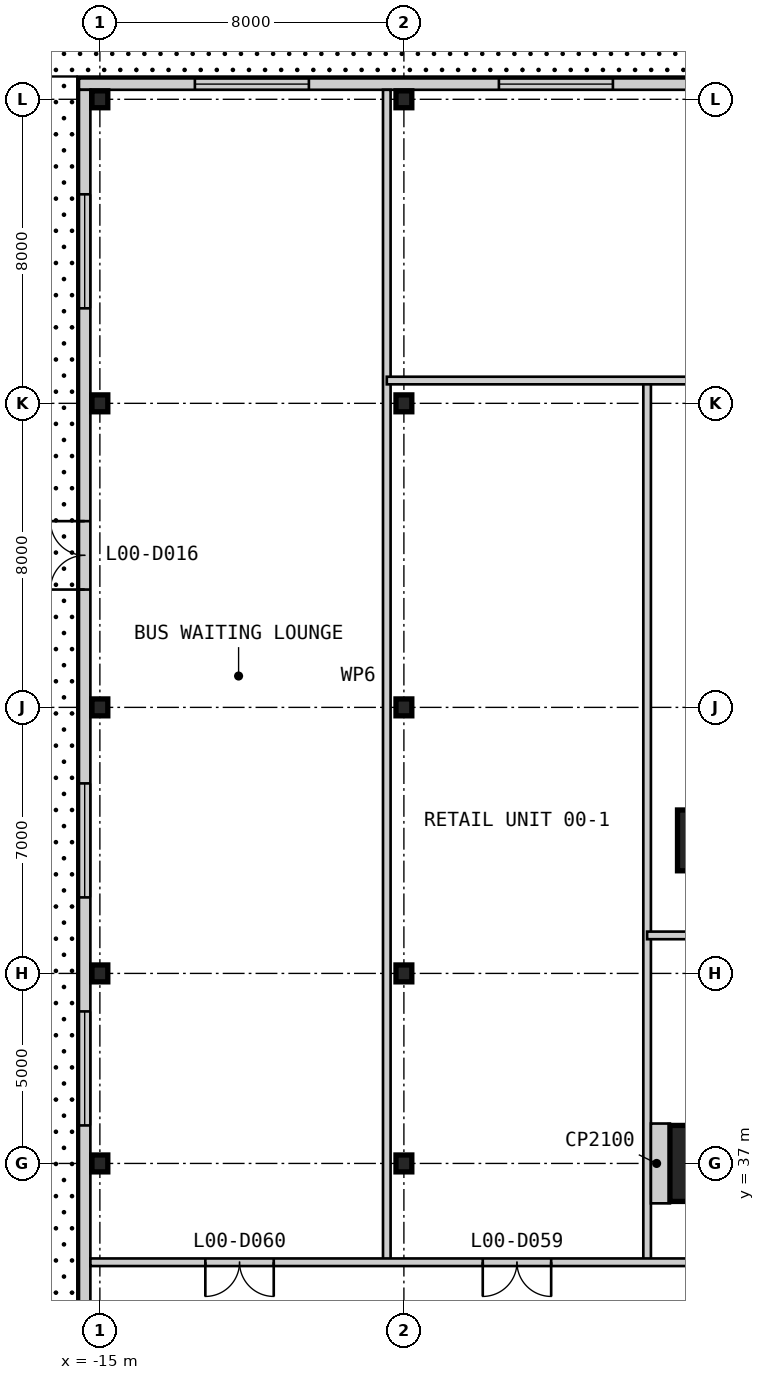
"""IFC4 building model, lengths in metres.
Left out: names, types, materials, properties, quantities, classifications, styles, units other than length and angle.
Written with IfcOpenShell. Run it as: python <this file> out.ifc"""

import sys

from ifc_helpers import new_model, si_unit, direction, frame, frame_2d, origin, origin_2d, place, context, subcontext, project, spatial, rectangle, i_section, extrude, element, fill, save


model = new_model("IFC4")
c1 = context("Model", 3, precision=1e-05, world=origin(), true_north=direction((0.0, 1.0)))
c2 = subcontext(c1, "Body", "Model", "MODEL_VIEW")
j1 = project(units=[si_unit("LENGTHUNIT", "METRE"), si_unit("PLANEANGLEUNIT", "RADIAN")], contexts=[c1])
p1 = place(None, origin())
s1 = spatial("IfcSite", under=j1, at=p1, CompositionType="ELEMENT")
p2 = place(p1, origin())
s2 = spatial("IfcBuilding", under=s1, at=p2, CompositionType="ELEMENT")
p3 = place(p2, origin())
s3 = spatial("IfcBuildingStorey", under=s2, at=p3, CompositionType="ELEMENT", Elevation=0.0)
p4 = place(p3, frame((1.0, 45.5, 0.0), z_axis=(0.0, 0.0, 1.0), x_axis=(1.0, 0.0, 0.0)))
e1 = element("IfcColumn", 1, at=p4, inside=s3, PredefinedType="COLUMN", context=c2, shape_type="SweptSolid", body=[
    extrude(rectangle(XDim=1.6, YDim=1.6, at=origin_2d()), origin(), (0.0, 0.0, 1.0), 7.0),
])
p5 = place(p3, frame((1.0, 37.0, 0.0), z_axis=(0.0, 0.0, 1.0), x_axis=(1.0, 0.0, 0.0)))
e2 = element("IfcColumn", 2, at=p5, inside=s3, PredefinedType="COLUMN", context=c2, shape_type="SweptSolid", body=[
    extrude(rectangle(XDim=2.0, YDim=2.0, at=origin_2d()), origin(), (0.0, 0.0, 1.0), 7.0),
])
for number, where, z_axis, x_axis in (
    (3, (-15.0, 37.0, -0.3), (0.0, 0.0, 1.0), (1.0, 0.0, 0.0)),
    (4, (-15.0, 42.0, -0.3), (0.0, 0.0, 1.0), (1.0, 0.0, 0.0)),
    (5, (-15.0, 49.0, -0.3), (0.0, 0.0, 1.0), (1.0, 0.0, 0.0)),
    (6, (-15.0, 57.0, -0.3), (0.0, 0.0, 1.0), (1.0, 0.0, 0.0)),
    (7, (-15.0, 65.0, -0.3), (0.0, 0.0, 1.0), (1.0, 0.0, 0.0)),
):
    element("IfcColumn", number, at=place(p3, frame(where, z_axis=z_axis, x_axis=x_axis)), inside=s3, PredefinedType="COLUMN", context=c2, shape_type="SweptSolid", body=[
        extrude(i_section(OverallWidth=0.417, OverallDepth=0.445, WebThickness=0.039, FlangeThickness=0.063, at=origin_2d()), origin(), (0.0, 0.0, 1.0), 7.3),
    ])
for number, where, z_axis, x_axis in (
    (8, (-7.0, 37.0, 0.0), (0.0, 0.0, 1.0), (1.0, 0.0, 0.0)),
    (9, (-7.0, 42.0, 0.0), (0.0, 0.0, 1.0), (1.0, 0.0, 0.0)),
    (10, (-7.0, 49.0, 0.0), (0.0, 0.0, 1.0), (1.0, 0.0, 0.0)),
    (11, (-7.0, 57.0, 0.0), (0.0, 0.0, 1.0), (1.0, 0.0, 0.0)),
):
    element("IfcColumn", number, at=place(p3, frame(where, z_axis=z_axis, x_axis=x_axis)), inside=s3, PredefinedType="COLUMN", context=c2, shape_type="SweptSolid", body=[
        extrude(i_section(OverallWidth=0.417, OverallDepth=0.445, WebThickness=0.039, FlangeThickness=0.063, at=origin_2d()), origin(), (0.0, 0.0, 1.0), 7.0),
    ])
p6 = place(p3, frame((-7.0, 65.0, -0.3), z_axis=(0.0, 0.0, 1.0), x_axis=(1.0, 0.0, 0.0)))
e12 = element("IfcColumn", 12, at=p6, inside=s3, PredefinedType="COLUMN", context=c2, shape_type="SweptSolid", body=[
    extrude(i_section(OverallWidth=0.417, OverallDepth=0.445, WebThickness=0.039, FlangeThickness=0.063, at=origin_2d()), origin(), (0.0, 0.0, 1.0), 7.3),
])
p7 = place(p3, frame((65.55, 65.4, 0.0), z_axis=(0.0, 0.0, 1.0), x_axis=(-1.0, 0.0, 0.0)))
e13 = element("IfcWall", 13, at=p7, inside=s3, PredefinedType="SOLIDWALL", context=c2, shape_type="SweptSolid", body=[
    extrude(rectangle(XDim=81.1, YDim=0.3, at=frame_2d((40.55, 0.0))), origin(), (0.0, 0.0, 1.0), 6.7),
])
p8 = place(p7, frame((37.65, 0.0, 0.0)))
e14 = element("IfcOpeningElement", 14, at=p8, cuts=e13, PredefinedType="OPENING", context=c2, shape_type="SweptSolid", body=[
    extrude(rectangle(XDim=1.8, YDim=2.4, at=frame_2d((0.9, 1.2))), frame((0.0, 0.16, 0.0), z_axis=(0.0, -1.0, 0.0), x_axis=(1.0, 0.0, 0.0)), (0.0, 0.0, 1.0), 0.32),
])
p9 = place(p7, frame((33.65, 0.0, 0.0)))
e15 = element("IfcOpeningElement", 15, at=p9, cuts=e13, PredefinedType="OPENING", context=c2, shape_type="SweptSolid", body=[
    extrude(rectangle(XDim=1.8, YDim=2.4, at=frame_2d((0.9, 1.2))), frame((0.0, 0.16, 0.0), z_axis=(0.0, -1.0, 0.0), x_axis=(1.0, 0.0, 0.0)), (0.0, 0.0, 1.0), 0.32),
])
p10 = place(p7, frame((18.25, 0.0, 0.0)))
e16 = element("IfcOpeningElement", 16, at=p10, cuts=e13, PredefinedType="OPENING", context=c2, shape_type="SweptSolid", body=[
    extrude(rectangle(XDim=3.6, YDim=4.5, at=frame_2d((1.8, 2.25))), frame((0.0, 0.16, 0.0), z_axis=(0.0, -1.0, 0.0), x_axis=(1.0, 0.0, 0.0)), (0.0, 0.0, 1.0), 0.32),
])
p11 = place(p7, frame((75.05, 0.0, 0.9)))
e17 = element("IfcOpeningElement", 17, at=p11, cuts=e13, PredefinedType="OPENING", context=c2, shape_type="SweptSolid", body=[
    extrude(rectangle(XDim=3.0, YDim=2.4, at=frame_2d((1.5, 1.2))), frame((0.0, 0.16, 0.0), z_axis=(0.0, -1.0, 0.0), x_axis=(1.0, 0.0, 0.0)), (0.0, 0.0, 1.0), 0.32),
])
p12 = place(p7, frame((67.05, 0.0, 0.9)))
e18 = element("IfcOpeningElement", 18, at=p12, cuts=e13, PredefinedType="OPENING", context=c2, shape_type="SweptSolid", body=[
    extrude(rectangle(XDim=3.0, YDim=2.4, at=frame_2d((1.5, 1.2))), frame((0.0, 0.16, 0.0), z_axis=(0.0, -1.0, 0.0), x_axis=(1.0, 0.0, 0.0)), (0.0, 0.0, 1.0), 0.32),
])
p13 = place(p7, frame((59.05, 0.0, 0.9)))
e19 = element("IfcOpeningElement", 19, at=p13, cuts=e13, PredefinedType="OPENING", context=c2, shape_type="SweptSolid", body=[
    extrude(rectangle(XDim=3.0, YDim=2.4, at=frame_2d((1.5, 1.2))), frame((0.0, 0.16, 0.0), z_axis=(0.0, -1.0, 0.0), x_axis=(1.0, 0.0, 0.0)), (0.0, 0.0, 1.0), 0.32),
])
p14 = place(p7, frame((45.05, 0.0, 0.9)))
e20 = element("IfcOpeningElement", 20, at=p14, cuts=e13, PredefinedType="OPENING", context=c2, shape_type="SweptSolid", body=[
    extrude(rectangle(XDim=3.0, YDim=2.4, at=frame_2d((1.5, 1.2))), frame((0.0, 0.16, 0.0), z_axis=(0.0, -1.0, 0.0), x_axis=(1.0, 0.0, 0.0)), (0.0, 0.0, 1.0), 0.32),
])
p15 = place(p7, frame((24.55, 0.0, 0.9)))
e21 = element("IfcOpeningElement", 21, at=p15, cuts=e13, PredefinedType="OPENING", context=c2, shape_type="SweptSolid", body=[
    extrude(rectangle(XDim=3.0, YDim=2.4, at=frame_2d((1.5, 1.2))), frame((0.0, 0.16, 0.0), z_axis=(0.0, -1.0, 0.0), x_axis=(1.0, 0.0, 0.0)), (0.0, 0.0, 1.0), 0.32),
])
p16 = place(p7, frame((11.05, 0.0, 0.9)))
e22 = element("IfcOpeningElement", 22, at=p16, cuts=e13, PredefinedType="OPENING", context=c2, shape_type="SweptSolid", body=[
    extrude(rectangle(XDim=3.0, YDim=2.4, at=frame_2d((1.5, 1.2))), frame((0.0, 0.16, 0.0), z_axis=(0.0, -1.0, 0.0), x_axis=(1.0, 0.0, 0.0)), (0.0, 0.0, 1.0), 0.32),
])
p17 = place(p7, frame((3.05, 0.0, 0.9)))
e23 = element("IfcOpeningElement", 23, at=p17, cuts=e13, PredefinedType="OPENING", context=c2, shape_type="SweptSolid", body=[
    extrude(rectangle(XDim=3.0, YDim=2.4, at=frame_2d((1.5, 1.2))), frame((0.0, 0.16, 0.0), z_axis=(0.0, -1.0, 0.0), x_axis=(1.0, 0.0, 0.0)), (0.0, 0.0, 1.0), 0.32),
])
p18 = place(p3, frame((-15.4, 65.25, 0.0), z_axis=(0.0, 0.0, 1.0), x_axis=(0.0, -1.0, 0.0)))
e24 = element("IfcWall", 24, at=p18, inside=s3, PredefinedType="SOLIDWALL", context=c2, shape_type="SweptSolid", body=[
    extrude(rectangle(XDim=80.5, YDim=0.3, at=frame_2d((40.25, 0.0))), origin(), (0.0, 0.0, 1.0), 6.7),
])
p19 = place(p18, frame((67.35, 0.0, 0.0)))
e25 = element("IfcOpeningElement", 25, at=p19, cuts=e24, PredefinedType="OPENING", context=c2, shape_type="SweptSolid", body=[
    extrude(rectangle(XDim=1.8, YDim=2.4, at=frame_2d((0.9, 1.2))), frame((0.0, 0.16, 0.0), z_axis=(0.0, -1.0, 0.0), x_axis=(1.0, 0.0, 0.0)), (0.0, 0.0, 1.0), 0.32),
])
p20 = place(p18, frame((45.35, 0.0, 0.0)))
e26 = element("IfcOpeningElement", 26, at=p20, cuts=e24, PredefinedType="OPENING", context=c2, shape_type="SweptSolid", body=[
    extrude(rectangle(XDim=1.8, YDim=2.4, at=frame_2d((0.9, 1.2))), frame((0.0, 0.16, 0.0), z_axis=(0.0, -1.0, 0.0), x_axis=(1.0, 0.0, 0.0)), (0.0, 0.0, 1.0), 0.32),
])
p21 = place(p18, frame((33.35, 0.0, 0.0)))
e27 = element("IfcOpeningElement", 27, at=p21, cuts=e24, PredefinedType="OPENING", context=c2, shape_type="SweptSolid", body=[
    extrude(rectangle(XDim=1.8, YDim=2.4, at=frame_2d((0.9, 1.2))), frame((0.0, 0.16, 0.0), z_axis=(0.0, -1.0, 0.0), x_axis=(1.0, 0.0, 0.0)), (0.0, 0.0, 1.0), 0.32),
])
p22 = place(p18, frame((11.35, 0.0, 0.0)))
e28 = element("IfcOpeningElement", 28, at=p22, cuts=e24, PredefinedType="OPENING", context=c2, shape_type="SweptSolid", body=[
    extrude(rectangle(XDim=1.8, YDim=2.4, at=frame_2d((0.9, 1.2))), frame((0.0, 0.16, 0.0), z_axis=(0.0, -1.0, 0.0), x_axis=(1.0, 0.0, 0.0)), (0.0, 0.0, 1.0), 0.32),
])
p23 = place(p18, frame((74.75, 0.0, 0.9)))
e29 = element("IfcOpeningElement", 29, at=p23, cuts=e24, PredefinedType="OPENING", context=c2, shape_type="SweptSolid", body=[
    extrude(rectangle(XDim=3.0, YDim=2.4, at=frame_2d((1.5, 1.2))), frame((0.0, 0.16, 0.0), z_axis=(0.0, -1.0, 0.0), x_axis=(1.0, 0.0, 0.0)), (0.0, 0.0, 1.0), 0.32),
])
p24 = place(p18, frame((58.75, 0.0, 0.9)))
e30 = element("IfcOpeningElement", 30, at=p24, cuts=e24, PredefinedType="OPENING", context=c2, shape_type="SweptSolid", body=[
    extrude(rectangle(XDim=3.0, YDim=2.4, at=frame_2d((1.5, 1.2))), frame((0.0, 0.16, 0.0), z_axis=(0.0, -1.0, 0.0), x_axis=(1.0, 0.0, 0.0)), (0.0, 0.0, 1.0), 0.32),
])
p25 = place(p18, frame((24.25, 0.0, 0.9)))
e31 = element("IfcOpeningElement", 31, at=p25, cuts=e24, PredefinedType="OPENING", context=c2, shape_type="SweptSolid", body=[
    extrude(rectangle(XDim=3.0, YDim=2.4, at=frame_2d((1.5, 1.2))), frame((0.0, 0.16, 0.0), z_axis=(0.0, -1.0, 0.0), x_axis=(1.0, 0.0, 0.0)), (0.0, 0.0, 1.0), 0.32),
])
p26 = place(p18, frame((18.25, 0.0, 0.9)))
e32 = element("IfcOpeningElement", 32, at=p26, cuts=e24, PredefinedType="OPENING", context=c2, shape_type="SweptSolid", body=[
    extrude(rectangle(XDim=3.0, YDim=2.4, at=frame_2d((1.5, 1.2))), frame((0.0, 0.16, 0.0), z_axis=(0.0, -1.0, 0.0), x_axis=(1.0, 0.0, 0.0)), (0.0, 0.0, 1.0), 0.32),
])
p27 = place(p18, frame((2.75, 0.0, 0.9)))
e33 = element("IfcOpeningElement", 33, at=p27, cuts=e24, PredefinedType="OPENING", context=c2, shape_type="SweptSolid", body=[
    extrude(rectangle(XDim=3.0, YDim=2.4, at=frame_2d((1.5, 1.2))), frame((0.0, 0.16, 0.0), z_axis=(0.0, -1.0, 0.0), x_axis=(1.0, 0.0, 0.0)), (0.0, 0.0, 1.0), 0.32),
])
p28 = place(p3, frame((-7.45, 34.4, 0.0), z_axis=(0.0, 0.0, 1.0), x_axis=(0.0, 1.0, 0.0)))
e34 = element("IfcWall", 34, at=p28, inside=s3, PredefinedType="PARTITIONING", context=c2, shape_type="SweptSolid", body=[
    extrude(rectangle(XDim=30.85, YDim=0.2, at=frame_2d((15.425, 0.0))), origin(), (0.0, 0.0, 1.0), 6.7),
])
p29 = place(p3, frame((-0.6, 34.4, 0.0), z_axis=(0.0, 0.0, 1.0), x_axis=(0.0, 1.0, 0.0)))
e35 = element("IfcWall", 35, at=p29, inside=s3, PredefinedType="PARTITIONING", context=c2, shape_type="SweptSolid", body=[
    extrude(rectangle(XDim=23.2, YDim=0.2, at=frame_2d((11.6, 0.0))), origin(), (0.0, 0.0, 1.0), 6.7),
])
p30 = place(p3, frame((-15.25, 34.4, 0.0), z_axis=(0.0, 0.0, 1.0), x_axis=(1.0, 0.0, 0.0)))
e36 = element("IfcWall", 36, at=p30, inside=s3, PredefinedType="PARTITIONING", context=c2, shape_type="SweptSolid", body=[
    extrude(rectangle(XDim=22.25, YDim=0.2, at=frame_2d((11.125, 0.0))), origin(), (0.0, 0.0, 1.0), 6.7),
])
p31 = place(p30, frame((17.525, 0.0, 0.0)))
e37 = element("IfcOpeningElement", 37, at=p31, cuts=e36, PredefinedType="OPENING", context=c2, shape_type="SweptSolid", body=[
    extrude(rectangle(XDim=1.8, YDim=2.4, at=frame_2d((0.9, 1.2))), frame((0.0, 0.11, 0.0), z_axis=(0.0, -1.0, 0.0), x_axis=(1.0, 0.0, 0.0)), (0.0, 0.0, 1.0), 0.22),
])
p32 = place(p30, frame((10.325, 0.0, 0.0)))
e38 = element("IfcOpeningElement", 38, at=p32, cuts=e36, PredefinedType="OPENING", context=c2, shape_type="SweptSolid", body=[
    extrude(rectangle(XDim=1.8, YDim=2.4, at=frame_2d((0.9, 1.2))), frame((0.0, 0.11, 0.0), z_axis=(0.0, -1.0, 0.0), x_axis=(1.0, 0.0, 0.0)), (0.0, 0.0, 1.0), 0.22),
])
p33 = place(p30, frame((3.025, 0.0, 0.0)))
e39 = element("IfcOpeningElement", 39, at=p33, cuts=e36, PredefinedType="OPENING", context=c2, shape_type="SweptSolid", body=[
    extrude(rectangle(XDim=1.8, YDim=2.4, at=frame_2d((0.9, 1.2))), frame((0.0, 0.11, 0.0), z_axis=(0.0, -1.0, 0.0), x_axis=(1.0, 0.0, 0.0)), (0.0, 0.0, 1.0), 0.22),
])
p34 = place(p3, frame((-0.6, 43.0, 0.0), z_axis=(0.0, 0.0, 1.0), x_axis=(1.0, 0.0, 0.0)))
e40 = element("IfcWall", 40, at=p34, inside=s3, PredefinedType="PARTITIONING", context=c2, shape_type="SweptSolid", body=[
    extrude(rectangle(XDim=14.6, YDim=0.2, at=frame_2d((7.3, 0.0))), origin(), (0.0, 0.0, 1.0), 6.7),
])
p35 = place(p3, frame((-7.45, 57.6, 0.0), z_axis=(0.0, 0.0, 1.0), x_axis=(1.0, 0.0, 0.0)))
e41 = element("IfcWall", 41, at=p35, inside=s3, PredefinedType="PARTITIONING", context=c2, shape_type="SweptSolid", body=[
    extrude(rectangle(XDim=19.05, YDim=0.2, at=frame_2d((9.525, 0.0))), origin(), (0.0, 0.0, 1.0), 6.7),
])
p36 = place(p3, frame((-0.5, 37.0, 0.0), z_axis=(0.0, 0.0, 1.0), x_axis=(1.0, 0.0, 0.0)))
e42 = element("IfcWall", 42, at=p36, inside=s3, PredefinedType="PARTITIONING", context=c2, shape_type="SweptSolid", body=[
    extrude(rectangle(XDim=0.5, YDim=2.1, at=frame_2d((0.25, 0.0))), origin(), (0.0, 0.0, 1.0), 6.7),
])
p37 = place(p11, origin())
e43 = element("IfcWindow", 43, at=p37, inside=s3, PartitioningType="SINGLE_PANEL", PredefinedType="WINDOW", context=c2, shape_type="SweptSolid", body=[
    extrude(rectangle(XDim=3.0, YDim=2.4, at=frame_2d((1.5, 1.2))), frame((0.0, 0.03, 0.0), z_axis=(0.0, -1.0, 0.0), x_axis=(1.0, 0.0, 0.0)), (0.0, 0.0, 1.0), 0.06),
])
fill(e17, e43)
p38 = place(p12, origin())
e44 = element("IfcWindow", 44, at=p38, inside=s3, PartitioningType="SINGLE_PANEL", PredefinedType="WINDOW", context=c2, shape_type="SweptSolid", body=[
    extrude(rectangle(XDim=3.0, YDim=2.4, at=frame_2d((1.5, 1.2))), frame((0.0, 0.03, 0.0), z_axis=(0.0, -1.0, 0.0), x_axis=(1.0, 0.0, 0.0)), (0.0, 0.0, 1.0), 0.06),
])
fill(e18, e44)
p39 = place(p22, frame((1.8, 0.0, 0.0), z_axis=(0.0, 0.0, 1.0), x_axis=(-1.0, 0.0, 0.0)))
e45 = element("IfcDoor", 45, at=p39, inside=s3, OperationType="DOUBLE_DOOR_SINGLE_SWING", PredefinedType="DOOR", context=c2, shape_type="SweptSolid", body=[
    extrude(rectangle(XDim=1.8, YDim=2.4, at=frame_2d((0.9, 1.2))), frame((0.0, 0.025, 0.0), z_axis=(0.0, -1.0, 0.0), x_axis=(1.0, 0.0, 0.0)), (0.0, 0.0, 1.0), 0.05),
])
fill(e28, e45)
p40 = place(p25, origin())
e46 = element("IfcWindow", 46, at=p40, inside=s3, PartitioningType="SINGLE_PANEL", PredefinedType="WINDOW", context=c2, shape_type="SweptSolid", body=[
    extrude(rectangle(XDim=3.0, YDim=2.4, at=frame_2d((1.5, 1.2))), frame((0.0, 0.03, 0.0), z_axis=(0.0, -1.0, 0.0), x_axis=(1.0, 0.0, 0.0)), (0.0, 0.0, 1.0), 0.06),
])
fill(e31, e46)
p41 = place(p26, origin())
e47 = element("IfcWindow", 47, at=p41, inside=s3, PartitioningType="SINGLE_PANEL", PredefinedType="WINDOW", context=c2, shape_type="SweptSolid", body=[
    extrude(rectangle(XDim=3.0, YDim=2.4, at=frame_2d((1.5, 1.2))), frame((0.0, 0.03, 0.0), z_axis=(0.0, -1.0, 0.0), x_axis=(1.0, 0.0, 0.0)), (0.0, 0.0, 1.0), 0.06),
])
fill(e32, e47)
p42 = place(p27, origin())
e48 = element("IfcWindow", 48, at=p42, inside=s3, PartitioningType="SINGLE_PANEL", PredefinedType="WINDOW", context=c2, shape_type="SweptSolid", body=[
    extrude(rectangle(XDim=3.0, YDim=2.4, at=frame_2d((1.5, 1.2))), frame((0.0, 0.03, 0.0), z_axis=(0.0, -1.0, 0.0), x_axis=(1.0, 0.0, 0.0)), (0.0, 0.0, 1.0), 0.06),
])
fill(e33, e48)
p43 = place(p32, frame((1.8, 0.0, 0.0), z_axis=(0.0, 0.0, 1.0), x_axis=(-1.0, 0.0, 0.0)))
e49 = element("IfcDoor", 49, at=p43, inside=s3, OperationType="DOUBLE_DOOR_SINGLE_SWING", PredefinedType="DOOR", context=c2, shape_type="SweptSolid", body=[
    extrude(rectangle(XDim=1.8, YDim=2.4, at=frame_2d((0.9, 1.2))), frame((0.0, 0.025, 0.0), z_axis=(0.0, -1.0, 0.0), x_axis=(1.0, 0.0, 0.0)), (0.0, 0.0, 1.0), 0.05),
])
fill(e38, e49)
p44 = place(p33, frame((1.8, 0.0, 0.0), z_axis=(0.0, 0.0, 1.0), x_axis=(-1.0, 0.0, 0.0)))
e50 = element("IfcDoor", 50, at=p44, inside=s3, OperationType="DOUBLE_DOOR_SINGLE_SWING", PredefinedType="DOOR", context=c2, shape_type="SweptSolid", body=[
    extrude(rectangle(XDim=1.8, YDim=2.4, at=frame_2d((0.9, 1.2))), frame((0.0, 0.025, 0.0), z_axis=(0.0, -1.0, 0.0), x_axis=(1.0, 0.0, 0.0)), (0.0, 0.0, 1.0), 0.05),
])
fill(e39, e50)
save(model, sys.argv[1])
